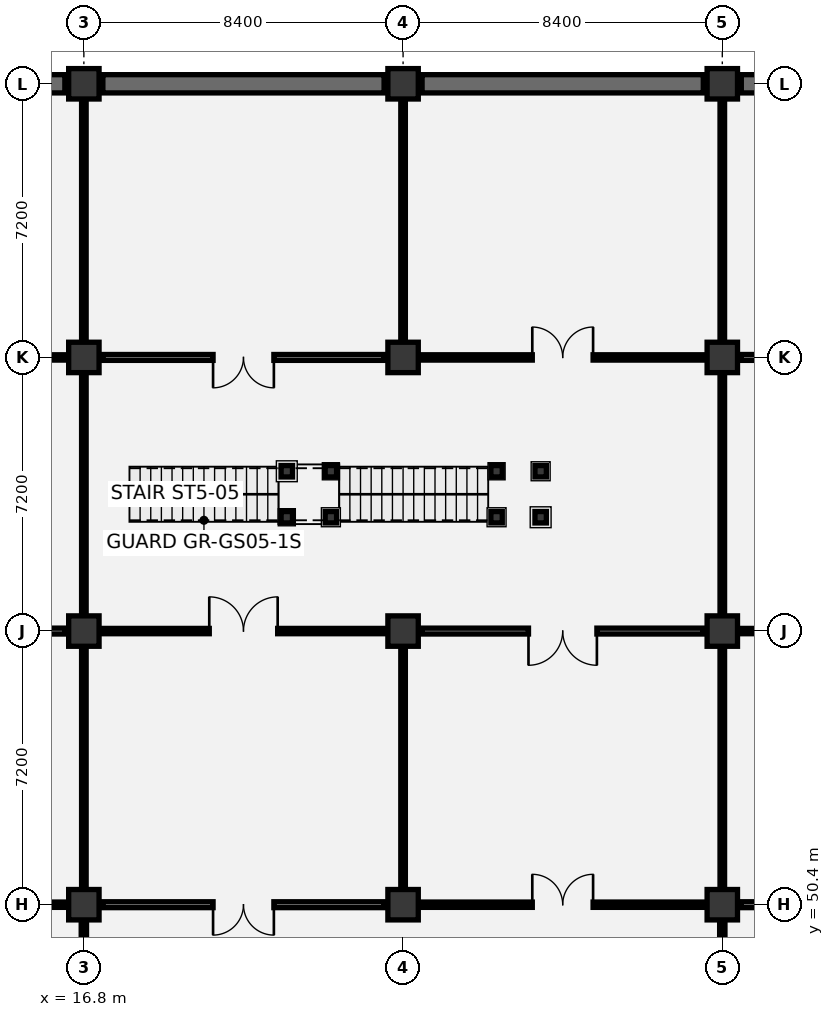
"""IFC4 building model, lengths in metres.
Left out: names, types, materials, properties, quantities, classifications, styles, units other than length and angle.
Written with IfcOpenShell. Run it as: python <this file> out.ifc"""

import sys

from ifc_helpers import new_model, si_unit, direction, frame, frame_2d, origin, origin_2d, place, context, subcontext, project, spatial, rectangle, i_section, extrude, element, fill, save


model = new_model("IFC4")
c1 = context("Model", 3, precision=1e-05, world=origin(), true_north=direction((0.0, 1.0)))
c2 = subcontext(c1, "Body", "Model", "MODEL_VIEW")
j1 = project(units=[si_unit("LENGTHUNIT", "METRE"), si_unit("PLANEANGLEUNIT", "RADIAN")], contexts=[c1])
p1 = place(None, origin())
s1 = spatial("IfcSite", under=j1, at=p1, CompositionType="ELEMENT")
p2 = place(p1, origin())
s2 = spatial("IfcBuilding", under=s1, at=p2, CompositionType="ELEMENT")
p3 = place(p2, frame((0.0, 0.0, -4.8)))
s3 = spatial("IfcBuildingStorey", under=s2, at=p3, CompositionType="ELEMENT", Elevation=-4.8)
for number, where, z_axis, x_axis in (
    (1, (16.8, 50.4, 0.0), (0.0, 0.0, 1.0), (1.0, 0.0, 0.0)),
    (2, (16.8, 57.6, 0.0), (0.0, 0.0, 1.0), (1.0, 0.0, 0.0)),
    (3, (16.8, 64.8, 0.0), (0.0, 0.0, 1.0), (1.0, 0.0, 0.0)),
    (4, (16.8, 72.0, 0.0), (0.0, 0.0, 1.0), (1.0, 0.0, 0.0)),
    (5, (25.2, 50.4, 0.0), (0.0, 0.0, 1.0), (1.0, 0.0, 0.0)),
    (6, (25.2, 57.6, 0.0), (0.0, 0.0, 1.0), (1.0, 0.0, 0.0)),
    (7, (25.2, 64.8, 0.0), (0.0, 0.0, 1.0), (1.0, 0.0, 0.0)),
    (8, (25.2, 72.0, 0.0), (0.0, 0.0, 1.0), (1.0, 0.0, 0.0)),
    (9, (33.6, 50.4, 0.0), (0.0, 0.0, 1.0), (1.0, 0.0, 0.0)),
    (10, (33.6, 57.6, 0.0), (0.0, 0.0, 1.0), (1.0, 0.0, 0.0)),
    (11, (33.6, 64.8, 0.0), (0.0, 0.0, 1.0), (1.0, 0.0, 0.0)),
    (12, (33.6, 72.0, 0.0), (0.0, 0.0, 1.0), (1.0, 0.0, 0.0)),
):
    element("IfcColumn", number, at=place(p3, frame(where, z_axis=z_axis, x_axis=x_axis)), inside=s3, PredefinedType="COLUMN", context=c2, shape_type="SweptSolid", body=[
        extrude(rectangle(XDim=0.8, YDim=0.8, at=origin_2d()), origin(), (0.0, 0.0, 1.0), 4.8),
    ])
for number, where, z_axis, x_axis in (
    (13, (22.14, 60.595, 0.0), (0.0, 0.0, 1.0), (1.0, 0.0, 0.0)),
    (14, (23.3, 60.595, 0.0), (0.0, 0.0, 1.0), (1.0, 0.0, 0.0)),
    (15, (22.14, 61.805, 0.0), (0.0, 0.0, 1.0), (1.0, 0.0, 0.0)),
    (16, (23.3, 61.805, 0.0), (0.0, 0.0, 1.0), (1.0, 0.0, 0.0)),
):
    element("IfcColumn", number, at=place(p3, frame(where, z_axis=z_axis, x_axis=x_axis)), inside=s3, PredefinedType="COLUMN", context=c2, shape_type="SweptSolid", body=[
        extrude(i_section(OverallWidth=0.3, OverallDepth=0.3, WebThickness=0.011, FlangeThickness=0.019, FilletRadius=0.027, at=origin_2d()), origin(), (0.0, 0.0, 1.0), 2.22),
    ])
for number, where, z_axis, x_axis in (
    (17, (27.66, 60.595, 0.0), (0.0, 0.0, 1.0), (1.0, 0.0, 0.0)),
    (18, (28.82, 60.595, 0.0), (0.0, 0.0, 1.0), (1.0, 0.0, 0.0)),
    (19, (27.66, 61.805, 0.0), (0.0, 0.0, 1.0), (1.0, 0.0, 0.0)),
    (20, (28.82, 61.805, 0.0), (0.0, 0.0, 1.0), (1.0, 0.0, 0.0)),
):
    element("IfcColumn", number, at=place(p3, frame(where, z_axis=z_axis, x_axis=x_axis)), inside=s3, PredefinedType="COLUMN", context=c2, shape_type="SweptSolid", body=[
        extrude(i_section(OverallWidth=0.3, OverallDepth=0.3, WebThickness=0.011, FlangeThickness=0.019, FilletRadius=0.027, at=origin_2d()), origin(), (0.0, 0.0, 1.0), 4.6),
    ])
p4 = place(p3, frame((8.9, 72.0, 0.0), z_axis=(0.0, 0.0, 1.0), x_axis=(1.0, 0.0, 0.0)))
e21 = element("IfcWall", 21, at=p4, inside=s3, PredefinedType="USERDEFINED", context=c2, shape_type="SweptSolid", body=[
    extrude(rectangle(XDim=7.4, YDim=0.48, at=frame_2d((3.7, 0.0))), origin(), (0.0, 0.0, 1.0), 4.45),
])
p5 = place(p3, frame((17.3, 72.0, 0.0), z_axis=(0.0, 0.0, 1.0), x_axis=(1.0, 0.0, 0.0)))
e22 = element("IfcWall", 22, at=p5, inside=s3, PredefinedType="USERDEFINED", context=c2, shape_type="SweptSolid", body=[
    extrude(rectangle(XDim=7.4, YDim=0.48, at=frame_2d((3.7, 0.0))), origin(), (0.0, 0.0, 1.0), 4.45),
])
p6 = place(p3, frame((25.7, 72.0, 0.0), z_axis=(0.0, 0.0, 1.0), x_axis=(1.0, 0.0, 0.0)))
e23 = element("IfcWall", 23, at=p6, inside=s3, PredefinedType="USERDEFINED", context=c2, shape_type="SweptSolid", body=[
    extrude(rectangle(XDim=7.4, YDim=0.48, at=frame_2d((3.7, 0.0))), origin(), (0.0, 0.0, 1.0), 4.45),
])
p7 = place(p3, frame((34.1, 72.0, 0.0), z_axis=(0.0, 0.0, 1.0), x_axis=(1.0, 0.0, 0.0)))
e24 = element("IfcWall", 24, at=p7, inside=s3, PredefinedType="USERDEFINED", context=c2, shape_type="SweptSolid", body=[
    extrude(rectangle(XDim=7.4, YDim=0.48, at=frame_2d((3.7, 0.0))), origin(), (0.0, 0.0, 1.0), 4.45),
])
p8 = place(p3, frame((16.8, 43.7, 0.0), z_axis=(0.0, 0.0, 1.0), x_axis=(0.0, 1.0, 0.0)))
e25 = element("IfcWall", 25, at=p8, inside=s3, PredefinedType="PARTITIONING", context=c2, shape_type="SweptSolid", body=[
    extrude(rectangle(XDim=6.2, YDim=0.14, at=frame_2d((3.1, 0.0))), origin(), (0.0, 0.0, 1.0), 3.645),
])
p9 = place(p8, frame((2.3, 0.0, 0.0)))
e26 = element("IfcOpeningElement", 26, at=p9, cuts=e25, PredefinedType="OPENING", context=c2, shape_type="SweptSolid", body=[
    extrude(rectangle(XDim=1.6, YDim=2.2, at=frame_2d((0.8, 1.1))), frame((0.0, 0.08, 0.0), z_axis=(0.0, -1.0, 0.0), x_axis=(1.0, 0.0, 0.0)), (0.0, 0.0, 1.0), 0.16),
])
p10 = place(p3, frame((8.9, 50.4, 0.0), z_axis=(0.0, 0.0, 1.0), x_axis=(1.0, 0.0, 0.0)))
e27 = element("IfcWall", 27, at=p10, inside=s3, PredefinedType="PARTITIONING", context=c2, shape_type="SweptSolid", body=[
    extrude(rectangle(XDim=7.4, YDim=0.14, at=frame_2d((3.7, 0.0))), origin(), (0.0, 0.0, 1.0), 3.545),
])
p11 = place(p10, frame((2.8, 0.0, 0.0)))
e28 = element("IfcOpeningElement", 28, at=p11, cuts=e27, PredefinedType="OPENING", context=c2, shape_type="SweptSolid", body=[
    extrude(rectangle(XDim=1.8, YDim=2.25, at=frame_2d((0.9, 1.125))), frame((0.0, 0.08, 0.0), z_axis=(0.0, -1.0, 0.0), x_axis=(1.0, 0.0, 0.0)), (0.0, 0.0, 1.0), 0.16),
])
p12 = place(p3, frame((16.8, 50.9, 0.0), z_axis=(0.0, 0.0, 1.0), x_axis=(0.0, 1.0, 0.0)))
e29 = element("IfcWall", 29, at=p12, inside=s3, PredefinedType="PARTITIONING", context=c2, shape_type="SweptSolid", body=[
    extrude(rectangle(XDim=6.2, YDim=0.12, at=frame_2d((3.1, 0.0))), origin(), (0.0, 0.0, 1.0), 3.645),
])
p13 = place(p3, frame((8.9, 57.6, 0.0), z_axis=(0.0, 0.0, 1.0), x_axis=(1.0, 0.0, 0.0)))
e30 = element("IfcWall", 30, at=p13, inside=s3, PredefinedType="PARTITIONING", context=c2, shape_type="SweptSolid", body=[
    extrude(rectangle(XDim=7.4, YDim=0.155, at=frame_2d((3.7, 0.0))), origin(), (0.0, 0.0, 1.0), 3.545),
])
p14 = place(p13, frame((2.9, 0.0, 0.0)))
e31 = element("IfcOpeningElement", 31, at=p14, cuts=e30, PredefinedType="OPENING", context=c2, shape_type="SweptSolid", body=[
    extrude(rectangle(XDim=1.6, YDim=2.2, at=frame_2d((0.8, 1.1))), frame((0.0, 0.087, 0.0), z_axis=(0.0, -1.0, 0.0), x_axis=(1.0, 0.0, 0.0)), (0.0, 0.0, 1.0), 0.175),
])
p15 = place(p3, frame((16.8, 58.1, 0.0), z_axis=(0.0, 0.0, 1.0), x_axis=(0.0, 1.0, 0.0)))
e32 = element("IfcWall", 32, at=p15, inside=s3, PredefinedType="PARTITIONING", context=c2, shape_type="SweptSolid", body=[
    extrude(rectangle(XDim=6.2, YDim=0.12, at=frame_2d((3.1, 0.0))), origin(), (0.0, 0.0, 1.0), 3.645),
])
p16 = place(p3, frame((8.9, 64.8, 0.0), z_axis=(0.0, 0.0, 1.0), x_axis=(1.0, 0.0, 0.0)))
e33 = element("IfcWall", 33, at=p16, inside=s3, PredefinedType="PARTITIONING", context=c2, shape_type="SweptSolid", body=[
    extrude(rectangle(XDim=7.4, YDim=0.14, at=frame_2d((3.7, 0.0))), origin(), (0.0, 0.0, 1.0), 3.545),
])
p17 = place(p16, frame((2.8, 0.0, 0.0)))
e34 = element("IfcOpeningElement", 34, at=p17, cuts=e33, PredefinedType="OPENING", context=c2, shape_type="SweptSolid", body=[
    extrude(rectangle(XDim=1.8, YDim=2.25, at=frame_2d((0.9, 1.125))), frame((0.0, 0.08, 0.0), z_axis=(0.0, -1.0, 0.0), x_axis=(1.0, 0.0, 0.0)), (0.0, 0.0, 1.0), 0.16),
])
p18 = place(p3, frame((16.8, 65.3, 0.0), z_axis=(0.0, 0.0, 1.0), x_axis=(0.0, 1.0, 0.0)))
e35 = element("IfcWall", 35, at=p18, inside=s3, PredefinedType="PARTITIONING", context=c2, shape_type="SweptSolid", body=[
    extrude(rectangle(XDim=6.2, YDim=0.12, at=frame_2d((3.1, 0.0))), origin(), (0.0, 0.0, 1.0), 3.645),
])
p19 = place(p3, frame((17.3, 50.4, 0.0), z_axis=(0.0, 0.0, 1.0), x_axis=(1.0, 0.0, 0.0)))
e36 = element("IfcWall", 36, at=p19, inside=s3, PredefinedType="PARTITIONING", context=c2, shape_type="SweptSolid", body=[
    extrude(rectangle(XDim=7.4, YDim=0.155, at=frame_2d((3.7, 0.0))), origin(), (0.0, 0.0, 1.0), 3.545),
])
p20 = place(p19, frame((2.9, 0.0, 0.0)))
e37 = element("IfcOpeningElement", 37, at=p20, cuts=e36, PredefinedType="OPENING", context=c2, shape_type="SweptSolid", body=[
    extrude(rectangle(XDim=1.6, YDim=2.2, at=frame_2d((0.8, 1.1))), frame((0.0, 0.087, 0.0), z_axis=(0.0, -1.0, 0.0), x_axis=(1.0, 0.0, 0.0)), (0.0, 0.0, 1.0), 0.175),
])
p21 = place(p3, frame((25.2, 50.9, 0.0), z_axis=(0.0, 0.0, 1.0), x_axis=(0.0, 1.0, 0.0)))
e38 = element("IfcWall", 38, at=p21, inside=s3, PredefinedType="PARTITIONING", context=c2, shape_type="SweptSolid", body=[
    extrude(rectangle(XDim=6.2, YDim=0.12, at=frame_2d((3.1, 0.0))), origin(), (0.0, 0.0, 1.0), 3.645),
])
p22 = place(p3, frame((17.3, 57.6, 0.0), z_axis=(0.0, 0.0, 1.0), x_axis=(1.0, 0.0, 0.0)))
e39 = element("IfcWall", 39, at=p22, inside=s3, PredefinedType="PARTITIONING", context=c2, shape_type="SweptSolid", body=[
    extrude(rectangle(XDim=7.4, YDim=0.14, at=frame_2d((3.7, 0.0))), origin(), (0.0, 0.0, 1.0), 3.545),
])
p23 = place(p22, frame((2.8, 0.0, 0.0)))
e40 = element("IfcOpeningElement", 40, at=p23, cuts=e39, PredefinedType="OPENING", context=c2, shape_type="SweptSolid", body=[
    extrude(rectangle(XDim=1.8, YDim=2.25, at=frame_2d((0.9, 1.125))), frame((0.0, 0.08, 0.0), z_axis=(0.0, -1.0, 0.0), x_axis=(1.0, 0.0, 0.0)), (0.0, 0.0, 1.0), 0.16),
])
p24 = place(p3, frame((17.3, 64.8, 0.0), z_axis=(0.0, 0.0, 1.0), x_axis=(1.0, 0.0, 0.0)))
e41 = element("IfcWall", 41, at=p24, inside=s3, PredefinedType="PARTITIONING", context=c2, shape_type="SweptSolid", body=[
    extrude(rectangle(XDim=7.4, YDim=0.155, at=frame_2d((3.7, 0.0))), origin(), (0.0, 0.0, 1.0), 3.545),
])
p25 = place(p24, frame((2.9, 0.0, 0.0)))
e42 = element("IfcOpeningElement", 42, at=p25, cuts=e41, PredefinedType="OPENING", context=c2, shape_type="SweptSolid", body=[
    extrude(rectangle(XDim=1.6, YDim=2.2, at=frame_2d((0.8, 1.1))), frame((0.0, 0.087, 0.0), z_axis=(0.0, -1.0, 0.0), x_axis=(1.0, 0.0, 0.0)), (0.0, 0.0, 1.0), 0.175),
])
p26 = place(p3, frame((25.2, 65.3, 0.0), z_axis=(0.0, 0.0, 1.0), x_axis=(0.0, 1.0, 0.0)))
e43 = element("IfcWall", 43, at=p26, inside=s3, PredefinedType="PARTITIONING", context=c2, shape_type="SweptSolid", body=[
    extrude(rectangle(XDim=6.2, YDim=0.12, at=frame_2d((3.1, 0.0))), origin(), (0.0, 0.0, 1.0), 3.645),
])
p27 = place(p3, frame((33.6, 43.7, 0.0), z_axis=(0.0, 0.0, 1.0), x_axis=(0.0, 1.0, 0.0)))
e44 = element("IfcWall", 44, at=p27, inside=s3, PredefinedType="PARTITIONING", context=c2, shape_type="SweptSolid", body=[
    extrude(rectangle(XDim=6.2, YDim=0.14, at=frame_2d((3.1, 0.0))), origin(), (0.0, 0.0, 1.0), 3.645),
])
p28 = place(p27, frame((2.2, 0.0, 0.0)))
e45 = element("IfcOpeningElement", 45, at=p28, cuts=e44, PredefinedType="OPENING", context=c2, shape_type="SweptSolid", body=[
    extrude(rectangle(XDim=1.8, YDim=2.25, at=frame_2d((0.9, 1.125))), frame((0.0, 0.08, 0.0), z_axis=(0.0, -1.0, 0.0), x_axis=(1.0, 0.0, 0.0)), (0.0, 0.0, 1.0), 0.16),
])
p29 = place(p3, frame((25.7, 50.4, 0.0), z_axis=(0.0, 0.0, 1.0), x_axis=(1.0, 0.0, 0.0)))
e46 = element("IfcWall", 46, at=p29, inside=s3, PredefinedType="PARTITIONING", context=c2, shape_type="SweptSolid", body=[
    extrude(rectangle(XDim=7.4, YDim=0.14, at=frame_2d((3.7, 0.0))), origin(), (0.0, 0.0, 1.0), 3.545),
])
p30 = place(p29, frame((2.9, 0.0, 0.0)))
e47 = element("IfcOpeningElement", 47, at=p30, cuts=e46, PredefinedType="OPENING", context=c2, shape_type="SweptSolid", body=[
    extrude(rectangle(XDim=1.6, YDim=2.2, at=frame_2d((0.8, 1.1))), frame((0.0, 0.08, 0.0), z_axis=(0.0, -1.0, 0.0), x_axis=(1.0, 0.0, 0.0)), (0.0, 0.0, 1.0), 0.16),
])
p31 = place(p3, frame((33.6, 50.9, 0.0), z_axis=(0.0, 0.0, 1.0), x_axis=(0.0, 1.0, 0.0)))
e48 = element("IfcWall", 48, at=p31, inside=s3, PredefinedType="PARTITIONING", context=c2, shape_type="SweptSolid", body=[
    extrude(rectangle(XDim=6.2, YDim=0.12, at=frame_2d((3.1, 0.0))), origin(), (0.0, 0.0, 1.0), 3.645),
])
p32 = place(p3, frame((25.7, 57.6, 0.0), z_axis=(0.0, 0.0, 1.0), x_axis=(1.0, 0.0, 0.0)))
e49 = element("IfcWall", 49, at=p32, inside=s3, PredefinedType="PARTITIONING", context=c2, shape_type="SweptSolid", body=[
    extrude(rectangle(XDim=7.4, YDim=0.155, at=frame_2d((3.7, 0.0))), origin(), (0.0, 0.0, 1.0), 3.545),
])
p33 = place(p32, frame((2.8, 0.0, 0.0)))
e50 = element("IfcOpeningElement", 50, at=p33, cuts=e49, PredefinedType="OPENING", context=c2, shape_type="SweptSolid", body=[
    extrude(rectangle(XDim=1.8, YDim=2.25, at=frame_2d((0.9, 1.125))), frame((0.0, 0.087, 0.0), z_axis=(0.0, -1.0, 0.0), x_axis=(1.0, 0.0, 0.0)), (0.0, 0.0, 1.0), 0.175),
])
p34 = place(p3, frame((33.6, 58.1, 0.0), z_axis=(0.0, 0.0, 1.0), x_axis=(0.0, 1.0, 0.0)))
e51 = element("IfcWall", 51, at=p34, inside=s3, PredefinedType="PARTITIONING", context=c2, shape_type="SweptSolid", body=[
    extrude(rectangle(XDim=6.2, YDim=0.12, at=frame_2d((3.1, 0.0))), origin(), (0.0, 0.0, 1.0), 3.645),
])
p35 = place(p3, frame((25.7, 64.8, 0.0), z_axis=(0.0, 0.0, 1.0), x_axis=(1.0, 0.0, 0.0)))
e52 = element("IfcWall", 52, at=p35, inside=s3, PredefinedType="PARTITIONING", context=c2, shape_type="SweptSolid", body=[
    extrude(rectangle(XDim=7.4, YDim=0.14, at=frame_2d((3.7, 0.0))), origin(), (0.0, 0.0, 1.0), 3.545),
])
p36 = place(p35, frame((2.9, 0.0, 0.0)))
e53 = element("IfcOpeningElement", 53, at=p36, cuts=e52, PredefinedType="OPENING", context=c2, shape_type="SweptSolid", body=[
    extrude(rectangle(XDim=1.6, YDim=2.2, at=frame_2d((0.8, 1.1))), frame((0.0, 0.08, 0.0), z_axis=(0.0, -1.0, 0.0), x_axis=(1.0, 0.0, 0.0)), (0.0, 0.0, 1.0), 0.16),
])
p37 = place(p3, frame((33.6, 65.3, 0.0), z_axis=(0.0, 0.0, 1.0), x_axis=(0.0, 1.0, 0.0)))
e54 = element("IfcWall", 54, at=p37, inside=s3, PredefinedType="PARTITIONING", context=c2, shape_type="SweptSolid", body=[
    extrude(rectangle(XDim=6.2, YDim=0.12, at=frame_2d((3.1, 0.0))), origin(), (0.0, 0.0, 1.0), 3.645),
])
p38 = place(p3, frame((34.1, 50.4, 0.0), z_axis=(0.0, 0.0, 1.0), x_axis=(1.0, 0.0, 0.0)))
e55 = element("IfcWall", 55, at=p38, inside=s3, PredefinedType="PARTITIONING", context=c2, shape_type="SweptSolid", body=[
    extrude(rectangle(XDim=7.4, YDim=0.155, at=frame_2d((3.7, 0.0))), origin(), (0.0, 0.0, 1.0), 3.545),
])
p39 = place(p38, frame((2.9, 0.0, 0.0)))
e56 = element("IfcOpeningElement", 56, at=p39, cuts=e55, PredefinedType="OPENING", context=c2, shape_type="SweptSolid", body=[
    extrude(rectangle(XDim=1.6, YDim=2.2, at=frame_2d((0.8, 1.1))), frame((0.0, 0.087, 0.0), z_axis=(0.0, -1.0, 0.0), x_axis=(1.0, 0.0, 0.0)), (0.0, 0.0, 1.0), 0.175),
])
p40 = place(p3, frame((34.1, 57.6, 0.0), z_axis=(0.0, 0.0, 1.0), x_axis=(1.0, 0.0, 0.0)))
e57 = element("IfcWall", 57, at=p40, inside=s3, PredefinedType="PARTITIONING", context=c2, shape_type="SweptSolid", body=[
    extrude(rectangle(XDim=7.4, YDim=0.14, at=frame_2d((3.7, 0.0))), origin(), (0.0, 0.0, 1.0), 3.545),
])
p41 = place(p40, frame((2.8, 0.0, 0.0)))
e58 = element("IfcOpeningElement", 58, at=p41, cuts=e57, PredefinedType="OPENING", context=c2, shape_type="SweptSolid", body=[
    extrude(rectangle(XDim=1.8, YDim=2.25, at=frame_2d((0.9, 1.125))), frame((0.0, 0.08, 0.0), z_axis=(0.0, -1.0, 0.0), x_axis=(1.0, 0.0, 0.0)), (0.0, 0.0, 1.0), 0.16),
])
p42 = place(p3, frame((34.1, 64.8, 0.0), z_axis=(0.0, 0.0, 1.0), x_axis=(1.0, 0.0, 0.0)))
e59 = element("IfcWall", 59, at=p42, inside=s3, PredefinedType="PARTITIONING", context=c2, shape_type="SweptSolid", body=[
    extrude(rectangle(XDim=7.4, YDim=0.155, at=frame_2d((3.7, 0.0))), origin(), (0.0, 0.0, 1.0), 3.545),
])
p43 = place(p42, frame((2.9, 0.0, 0.0)))
e60 = element("IfcOpeningElement", 60, at=p43, cuts=e59, PredefinedType="OPENING", context=c2, shape_type="SweptSolid", body=[
    extrude(rectangle(XDim=1.6, YDim=2.2, at=frame_2d((0.8, 1.1))), frame((0.0, 0.087, 0.0), z_axis=(0.0, -1.0, 0.0), x_axis=(1.0, 0.0, 0.0)), (0.0, 0.0, 1.0), 0.175),
])
p44 = place(p20, frame((1.6, 0.0, 0.0), z_axis=(0.0, 0.0, 1.0), x_axis=(-1.0, 0.0, 0.0)))
e61 = element("IfcDoor", 61, at=p44, inside=s3, OperationType="DOUBLE_DOOR_SINGLE_SWING", PredefinedType="DOOR", context=c2, shape_type="SweptSolid", body=[
    extrude(rectangle(XDim=1.6, YDim=2.2, at=frame_2d((0.8, 1.1))), frame((0.0, 0.025, 0.0), z_axis=(0.0, -1.0, 0.0), x_axis=(1.0, 0.0, 0.0)), (0.0, 0.0, 1.0), 0.05),
])
fill(e37, e61)
p45 = place(p23, origin())
e62 = element("IfcDoor", 62, at=p45, inside=s3, OperationType="DOUBLE_DOOR_SINGLE_SWING", PredefinedType="DOOR", context=c2, shape_type="SweptSolid", body=[
    extrude(rectangle(XDim=1.8, YDim=2.25, at=frame_2d((0.9, 1.125))), frame((0.0, 0.025, 0.0), z_axis=(0.0, -1.0, 0.0), x_axis=(1.0, 0.0, 0.0)), (0.0, 0.0, 1.0), 0.05),
])
fill(e40, e62)
p46 = place(p25, frame((1.6, 0.0, 0.0), z_axis=(0.0, 0.0, 1.0), x_axis=(-1.0, 0.0, 0.0)))
e63 = element("IfcDoor", 63, at=p46, inside=s3, OperationType="DOUBLE_DOOR_SINGLE_SWING", PredefinedType="DOOR", context=c2, shape_type="SweptSolid", body=[
    extrude(rectangle(XDim=1.6, YDim=2.2, at=frame_2d((0.8, 1.1))), frame((0.0, 0.025, 0.0), z_axis=(0.0, -1.0, 0.0), x_axis=(1.0, 0.0, 0.0)), (0.0, 0.0, 1.0), 0.05),
])
fill(e42, e63)
p47 = place(p30, origin())
e64 = element("IfcDoor", 64, at=p47, inside=s3, OperationType="DOUBLE_DOOR_SINGLE_SWING", PredefinedType="DOOR", context=c2, shape_type="SweptSolid", body=[
    extrude(rectangle(XDim=1.6, YDim=2.2, at=frame_2d((0.8, 1.1))), frame((0.0, 0.025, 0.0), z_axis=(0.0, -1.0, 0.0), x_axis=(1.0, 0.0, 0.0)), (0.0, 0.0, 1.0), 0.05),
])
fill(e47, e64)
p48 = place(p33, frame((1.8, 0.0, 0.0), z_axis=(0.0, 0.0, 1.0), x_axis=(-1.0, 0.0, 0.0)))
e65 = element("IfcDoor", 65, at=p48, inside=s3, OperationType="DOUBLE_DOOR_SINGLE_SWING", PredefinedType="DOOR", context=c2, shape_type="SweptSolid", body=[
    extrude(rectangle(XDim=1.8, YDim=2.25, at=frame_2d((0.9, 1.125))), frame((0.0, 0.025, 0.0), z_axis=(0.0, -1.0, 0.0), x_axis=(1.0, 0.0, 0.0)), (0.0, 0.0, 1.0), 0.05),
])
fill(e50, e65)
p49 = place(p36, origin())
e66 = element("IfcDoor", 66, at=p49, inside=s3, OperationType="DOUBLE_DOOR_SINGLE_SWING", PredefinedType="DOOR", context=c2, shape_type="SweptSolid", body=[
    extrude(rectangle(XDim=1.6, YDim=2.2, at=frame_2d((0.8, 1.1))), frame((0.0, 0.025, 0.0), z_axis=(0.0, -1.0, 0.0), x_axis=(1.0, 0.0, 0.0)), (0.0, 0.0, 1.0), 0.05),
])
fill(e53, e66)
save(model, sys.argv[1])
